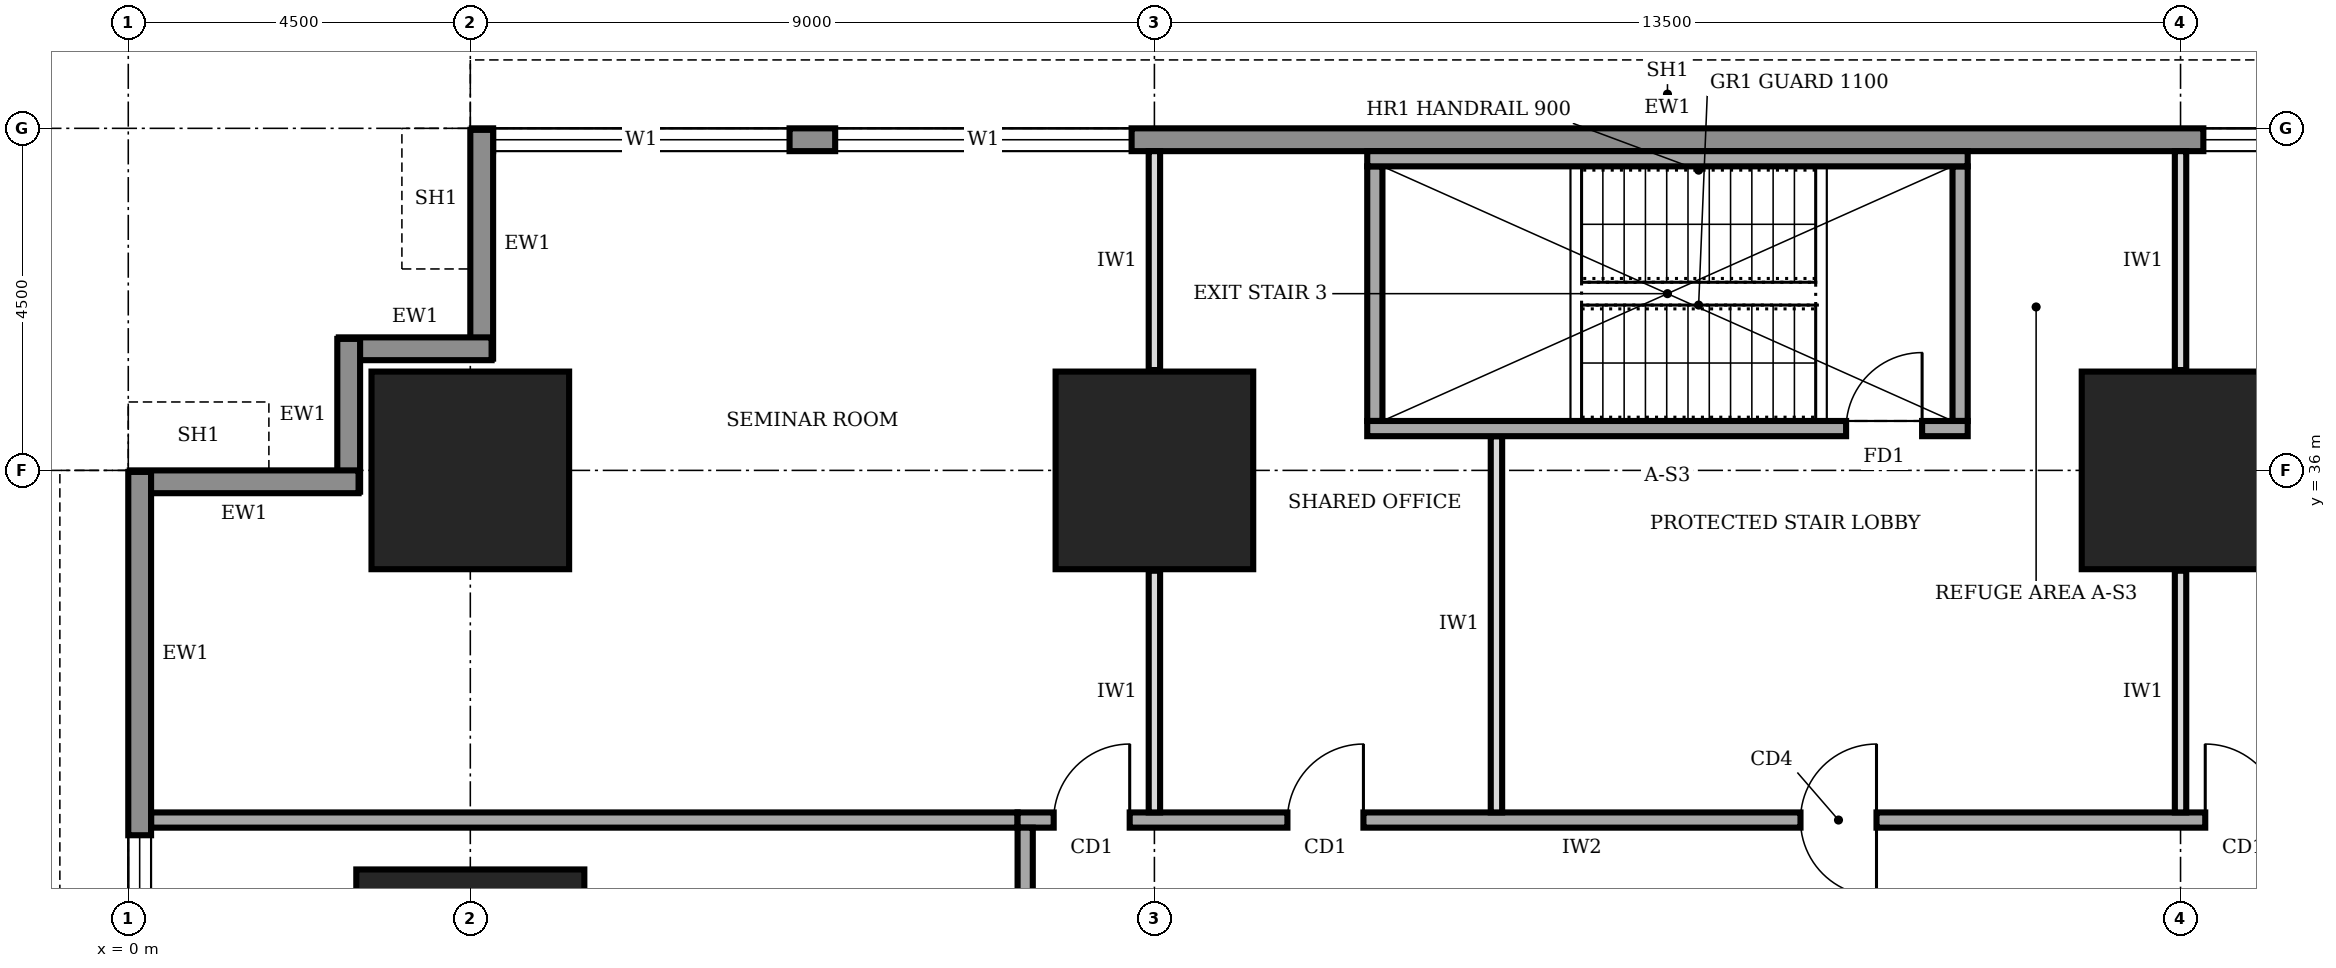
"""IFC4 building model, lengths in metres.
Left out: names, types, materials, properties, quantities, classifications, styles, units other than length and angle.
Written with IfcOpenShell. Run it as: python <this file> out.ifc"""

import sys

from ifc_helpers import new_model, si_unit, direction, frame, frame_2d, origin, origin_2d, place, context, subcontext, project, spatial, rectangle, extrude, element, fill, save


model = new_model("IFC4")
c1 = context("Model", 3, precision=1e-05, world=origin(), true_north=direction((0.0, 1.0)))
c2 = subcontext(c1, "Body", "Model", "MODEL_VIEW")
j1 = project(units=[si_unit("LENGTHUNIT", "METRE"), si_unit("PLANEANGLEUNIT", "RADIAN")], contexts=[c1])
p1 = place(None, origin())
s1 = spatial("IfcSite", under=j1, at=p1, CompositionType="ELEMENT")
p2 = place(p1, origin())
s2 = spatial("IfcBuilding", under=s1, at=p2, CompositionType="ELEMENT")
p3 = place(p2, frame((0.0, 0.0, 33.0)))
s3 = spatial("IfcBuildingStorey", under=s2, at=p3, CompositionType="ELEMENT", Elevation=33.0)
p4 = place(p3, frame((4.5, 29.25, 0.0), z_axis=(0.0, 0.0, 1.0), x_axis=(1.0, 0.0, 0.0)))
e1 = element("IfcColumn", 1, at=p4, inside=s3, PredefinedType="COLUMN", context=c2, shape_type="SweptSolid", body=[
    extrude(rectangle(XDim=3.0, YDim=3.0, at=origin_2d()), origin(), (0.0, 0.0, 1.0), 4.0),
])
for number, where, z_axis, x_axis in (
    (2, (4.5, 36.0, 0.0), (0.0, 0.0, 1.0), (1.0, 0.0, 0.0)),
    (3, (13.5, 36.0, 0.0), (0.0, 0.0, 1.0), (1.0, 0.0, 0.0)),
    (4, (27.0, 36.0, 0.0), (0.0, 0.0, 1.0), (1.0, 0.0, 0.0)),
):
    element("IfcColumn", number, at=place(p3, frame(where, z_axis=z_axis, x_axis=x_axis)), inside=s3, PredefinedType="COLUMN", context=c2, shape_type="SweptSolid", body=[
        extrude(rectangle(XDim=2.6, YDim=2.6, at=origin_2d()), origin(), (0.0, 0.0, 1.0), 4.0),
    ])
p5 = place(p3, frame((35.98, 40.35, 0.0), z_axis=(0.0, 0.0, 1.0), x_axis=(-1.0, 0.0, 0.0)))
e5 = element("IfcWall", 5, at=p5, inside=s3, PredefinedType="STANDARD", context=c2, shape_type="SweptSolid", body=[
    extrude(rectangle(XDim=31.46, YDim=0.3, at=frame_2d((15.73, 0.0))), origin(), (0.0, 0.0, 1.0), 3.75),
])
p6 = place(p5, frame((27.28, 0.0, 0.9)))
e6 = element("IfcOpeningElement", 6, at=p6, cuts=e5, PredefinedType="OPENING", context=c2, shape_type="SweptSolid", body=[
    extrude(rectangle(XDim=3.9, YDim=2.2, at=frame_2d((1.95, 1.1))), frame((0.0, 0.16, 0.0), z_axis=(0.0, -1.0, 0.0), x_axis=(1.0, 0.0, 0.0)), (0.0, 0.0, 1.0), 0.32),
])
p7 = place(p5, frame((22.78, 0.0, 0.9)))
e7 = element("IfcOpeningElement", 7, at=p7, cuts=e5, PredefinedType="OPENING", context=c2, shape_type="SweptSolid", body=[
    extrude(rectangle(XDim=3.9, YDim=2.2, at=frame_2d((1.95, 1.1))), frame((0.0, 0.16, 0.0), z_axis=(0.0, -1.0, 0.0), x_axis=(1.0, 0.0, 0.0)), (0.0, 0.0, 1.0), 0.32),
])
p8 = place(p5, frame((4.78, 0.0, 0.9)))
e8 = element("IfcOpeningElement", 8, at=p8, cuts=e5, PredefinedType="OPENING", context=c2, shape_type="SweptSolid", body=[
    extrude(rectangle(XDim=3.9, YDim=2.2, at=frame_2d((1.95, 1.1))), frame((0.0, 0.16, 0.0), z_axis=(0.0, -1.0, 0.0), x_axis=(1.0, 0.0, 0.0)), (0.0, 0.0, 1.0), 0.32),
])
p9 = place(p3, frame((4.65, 40.48, 0.0), z_axis=(0.0, 0.0, 1.0), x_axis=(0.0, -1.0, 0.0)))
e9 = element("IfcWall", 9, at=p9, inside=s3, PredefinedType="STANDARD", context=c2, shape_type="SweptSolid", body=[
    extrude(rectangle(XDim=3.01, YDim=0.3, at=frame_2d((1.505, 0.0))), origin(), (0.0, 0.0, 1.0), 2.85),
])
for number, where, z_axis, x_axis in (
    (10, (4.78, 37.6, 0.0), (0.0, 0.0, 1.0), (-1.0, 0.0, 0.0)),
    (11, (2.9, 37.73, 0.0), (0.0, 0.0, 1.0), (0.0, -1.0, 0.0)),
):
    element("IfcWall", number, at=place(p3, frame(where, z_axis=z_axis, x_axis=x_axis)), inside=s3, PredefinedType="STANDARD", context=c2, shape_type="SweptSolid", body=[
        extrude(rectangle(XDim=2.01, YDim=0.3, at=frame_2d((1.005, 0.0))), origin(), (0.0, 0.0, 1.0), 3.75),
    ])
p10 = place(p3, frame((3.03, 35.85, 0.0), z_axis=(0.0, 0.0, 1.0), x_axis=(-1.0, 0.0, 0.0)))
e12 = element("IfcWall", 12, at=p10, inside=s3, PredefinedType="STANDARD", context=c2, shape_type="SweptSolid", body=[
    extrude(rectangle(XDim=3.01, YDim=0.3, at=frame_2d((1.505, 0.0))), origin(), (0.0, 0.0, 1.0), 2.85),
])
p11 = place(p3, frame((0.15, 35.98, 0.0), z_axis=(0.0, 0.0, 1.0), x_axis=(0.0, -1.0, 0.0)))
e13 = element("IfcWall", 13, at=p11, inside=s3, PredefinedType="STANDARD", context=c2, shape_type="SweptSolid", body=[
    extrude(rectangle(XDim=31.46, YDim=0.3, at=frame_2d((15.73, 0.0))), origin(), (0.0, 0.0, 1.0), 3.75),
])
p12 = place(p11, frame((27.28, 0.0, 0.9)))
e14 = element("IfcOpeningElement", 14, at=p12, cuts=e13, PredefinedType="OPENING", context=c2, shape_type="SweptSolid", body=[
    extrude(rectangle(XDim=3.9, YDim=2.2, at=frame_2d((1.95, 1.1))), frame((0.0, 0.16, 0.0), z_axis=(0.0, -1.0, 0.0), x_axis=(1.0, 0.0, 0.0)), (0.0, 0.0, 1.0), 0.32),
])
p13 = place(p11, frame((22.78, 0.0, 0.9)))
e15 = element("IfcOpeningElement", 15, at=p13, cuts=e13, PredefinedType="OPENING", context=c2, shape_type="SweptSolid", body=[
    extrude(rectangle(XDim=3.9, YDim=2.2, at=frame_2d((1.95, 1.1))), frame((0.0, 0.16, 0.0), z_axis=(0.0, -1.0, 0.0), x_axis=(1.0, 0.0, 0.0)), (0.0, 0.0, 1.0), 0.32),
])
p14 = place(p11, frame((18.28, 0.0, 0.9)))
e16 = element("IfcOpeningElement", 16, at=p14, cuts=e13, PredefinedType="OPENING", context=c2, shape_type="SweptSolid", body=[
    extrude(rectangle(XDim=3.9, YDim=2.2, at=frame_2d((1.95, 1.1))), frame((0.0, 0.16, 0.0), z_axis=(0.0, -1.0, 0.0), x_axis=(1.0, 0.0, 0.0)), (0.0, 0.0, 1.0), 0.32),
])
p15 = place(p11, frame((13.78, 0.0, 0.9)))
e17 = element("IfcOpeningElement", 17, at=p15, cuts=e13, PredefinedType="OPENING", context=c2, shape_type="SweptSolid", body=[
    extrude(rectangle(XDim=3.9, YDim=2.2, at=frame_2d((1.95, 1.1))), frame((0.0, 0.16, 0.0), z_axis=(0.0, -1.0, 0.0), x_axis=(1.0, 0.0, 0.0)), (0.0, 0.0, 1.0), 0.32),
])
p16 = place(p11, frame((9.28, 0.0, 0.9)))
e18 = element("IfcOpeningElement", 18, at=p16, cuts=e13, PredefinedType="OPENING", context=c2, shape_type="SweptSolid", body=[
    extrude(rectangle(XDim=3.9, YDim=2.2, at=frame_2d((1.95, 1.1))), frame((0.0, 0.16, 0.0), z_axis=(0.0, -1.0, 0.0), x_axis=(1.0, 0.0, 0.0)), (0.0, 0.0, 1.0), 0.32),
])
p17 = place(p11, frame((4.78, 0.0, 0.9)))
e19 = element("IfcOpeningElement", 19, at=p17, cuts=e13, PredefinedType="OPENING", context=c2, shape_type="SweptSolid", body=[
    extrude(rectangle(XDim=3.9, YDim=2.2, at=frame_2d((1.95, 1.1))), frame((0.0, 0.16, 0.0), z_axis=(0.0, -1.0, 0.0), x_axis=(1.0, 0.0, 0.0)), (0.0, 0.0, 1.0), 0.32),
])
p18 = place(p3, frame((28.6, 31.4, 0.0), z_axis=(0.0, 0.0, 1.0), x_axis=(-1.0, 0.0, 0.0)))
e20 = element("IfcWall", 20, at=p18, inside=s3, PredefinedType="SOLIDWALL", context=c2, shape_type="SweptSolid", body=[
    extrude(rectangle(XDim=16.9, YDim=0.2, at=frame_2d((8.45, 0.0))), origin(), (0.0, 0.0, 1.0), 3.75),
])
p19 = place(p18, frame((15.425, 0.0, 0.0)))
e21 = element("IfcOpeningElement", 21, at=p19, cuts=e20, PredefinedType="OPENING", context=c2, shape_type="SweptSolid", body=[
    extrude(rectangle(XDim=1.0, YDim=2.1, at=frame_2d((0.5, 1.05))), frame((0.0, 0.11, 0.0), z_axis=(0.0, -1.0, 0.0), x_axis=(1.0, 0.0, 0.0)), (0.0, 0.0, 1.0), 0.22),
])
p20 = place(p18, frame((12.35, 0.0, 0.0)))
e22 = element("IfcOpeningElement", 22, at=p20, cuts=e20, PredefinedType="OPENING", context=c2, shape_type="SweptSolid", body=[
    extrude(rectangle(XDim=1.0, YDim=2.1, at=frame_2d((0.5, 1.05))), frame((0.0, 0.11, 0.0), z_axis=(0.0, -1.0, 0.0), x_axis=(1.0, 0.0, 0.0)), (0.0, 0.0, 1.0), 0.22),
])
p21 = place(p18, frame((5.6, 0.0, 0.0)))
e23 = element("IfcOpeningElement", 23, at=p21, cuts=e20, PredefinedType="OPENING", context=c2, shape_type="SweptSolid", body=[
    extrude(rectangle(XDim=1.0, YDim=2.1, at=frame_2d((0.5, 1.05))), frame((0.0, 0.11, 0.0), z_axis=(0.0, -1.0, 0.0), x_axis=(1.0, 0.0, 0.0)), (0.0, 0.0, 1.0), 0.22),
])
p22 = place(p18, frame((0.275, 0.0, 0.0)))
e24 = element("IfcOpeningElement", 24, at=p22, cuts=e20, PredefinedType="OPENING", context=c2, shape_type="SweptSolid", body=[
    extrude(rectangle(XDim=1.0, YDim=2.1, at=frame_2d((0.5, 1.05))), frame((0.0, 0.11, 0.0), z_axis=(0.0, -1.0, 0.0), x_axis=(1.0, 0.0, 0.0)), (0.0, 0.0, 1.0), 0.22),
])
p23 = place(p3, frame((11.8, 31.3, 0.0), z_axis=(0.0, 0.0, 1.0), x_axis=(0.0, -1.0, 0.0)))
e25 = element("IfcWall", 25, at=p23, inside=s3, PredefinedType="SOLIDWALL", context=c2, shape_type="SweptSolid", body=[
    extrude(rectangle(XDim=23.8, YDim=0.2, at=frame_2d((11.9, 0.0))), origin(), (0.0, 0.0, 1.0), 3.75),
])
p24 = place(p23, frame((20.3, 0.0, 0.0)))
e26 = element("IfcOpeningElement", 26, at=p24, cuts=e25, PredefinedType="OPENING", context=c2, shape_type="SweptSolid", body=[
    extrude(rectangle(XDim=1.0, YDim=2.1, at=frame_2d((0.5, 1.05))), frame((0.0, 0.11, 0.0), z_axis=(0.0, -1.0, 0.0), x_axis=(1.0, 0.0, 0.0)), (0.0, 0.0, 1.0), 0.22),
])
p25 = place(p23, frame((15.45, 0.0, 0.0)))
e27 = element("IfcOpeningElement", 27, at=p25, cuts=e25, PredefinedType="OPENING", context=c2, shape_type="SweptSolid", body=[
    extrude(rectangle(XDim=0.9, YDim=2.1, at=frame_2d((0.45, 1.05))), frame((0.0, 0.11, 0.0), z_axis=(0.0, -1.0, 0.0), x_axis=(1.0, 0.0, 0.0)), (0.0, 0.0, 1.0), 0.22),
])
p26 = place(p23, frame((12.45, 0.0, 0.0)))
e28 = element("IfcOpeningElement", 28, at=p26, cuts=e25, PredefinedType="OPENING", context=c2, shape_type="SweptSolid", body=[
    extrude(rectangle(XDim=0.9, YDim=2.1, at=frame_2d((0.45, 1.05))), frame((0.0, 0.11, 0.0), z_axis=(0.0, -1.0, 0.0), x_axis=(1.0, 0.0, 0.0)), (0.0, 0.0, 1.0), 0.22),
])
p27 = place(p23, frame((7.6, 0.0, 0.0)))
e29 = element("IfcOpeningElement", 29, at=p27, cuts=e25, PredefinedType="OPENING", context=c2, shape_type="SweptSolid", body=[
    extrude(rectangle(XDim=0.9, YDim=2.1, at=frame_2d((0.45, 1.05))), frame((0.0, 0.11, 0.0), z_axis=(0.0, -1.0, 0.0), x_axis=(1.0, 0.0, 0.0)), (0.0, 0.0, 1.0), 0.22),
])
p28 = place(p23, frame((4.8, 0.0, 0.0)))
e30 = element("IfcOpeningElement", 30, at=p28, cuts=e25, PredefinedType="OPENING", context=c2, shape_type="SweptSolid", body=[
    extrude(rectangle(XDim=1.0, YDim=2.1, at=frame_2d((0.5, 1.05))), frame((0.0, 0.11, 0.0), z_axis=(0.0, -1.0, 0.0), x_axis=(1.0, 0.0, 0.0)), (0.0, 0.0, 1.0), 0.22),
])
p29 = place(p23, frame((10.3, 0.0, 0.0)))
e31 = element("IfcOpeningElement", 31, at=p29, cuts=e25, PredefinedType="OPENING", context=c2, shape_type="SweptSolid", body=[
    extrude(rectangle(XDim=1.0, YDim=2.1, at=frame_2d((0.5, 1.05))), frame((0.0, 0.11, 0.0), z_axis=(0.0, -1.0, 0.0), x_axis=(1.0, 0.0, 0.0)), (0.0, 0.0, 1.0), 0.22),
])
p30 = place(p23, frame((1.55, 0.0, 0.0)))
e32 = element("IfcOpeningElement", 32, at=p30, cuts=e25, PredefinedType="OPENING", context=c2, shape_type="SweptSolid", body=[
    extrude(rectangle(XDim=1.0, YDim=2.1, at=frame_2d((0.5, 1.05))), frame((0.0, 0.11, 0.0), z_axis=(0.0, -1.0, 0.0), x_axis=(1.0, 0.0, 0.0)), (0.0, 0.0, 1.0), 0.22),
])
p31 = place(p3, frame((0.3, 31.4, 0.0), z_axis=(0.0, 0.0, 1.0), x_axis=(1.0, 0.0, 0.0)))
e33 = element("IfcWall", 33, at=p31, inside=s3, PredefinedType="SOLIDWALL", context=c2, shape_type="SweptSolid", body=[
    extrude(rectangle(XDim=11.4, YDim=0.2, at=frame_2d((5.7, 0.0))), origin(), (0.0, 0.0, 1.0), 3.75),
])
p32 = place(p3, frame((13.5, 31.5, 0.0), z_axis=(0.0, 0.0, 1.0), x_axis=(0.0, 1.0, 0.0)))
e34 = element("IfcWall", 34, at=p32, inside=s3, PredefinedType="PARTITIONING", context=c2, shape_type="SweptSolid", body=[
    extrude(rectangle(XDim=3.18, YDim=0.15, at=frame_2d((1.59, 0.0))), origin(), (0.0, 0.0, 1.0), 2.85),
])
p33 = place(p3, frame((13.5, 37.32, 0.0), z_axis=(0.0, 0.0, 1.0), x_axis=(0.0, 1.0, 0.0)))
e35 = element("IfcWall", 35, at=p33, inside=s3, PredefinedType="PARTITIONING", context=c2, shape_type="SweptSolid", body=[
    extrude(rectangle(XDim=2.88, YDim=0.15, at=frame_2d((1.44, 0.0))), origin(), (0.0, 0.0, 1.0), 2.85),
])
p34 = place(p3, frame((18.0, 31.5, 0.0), z_axis=(0.0, 0.0, 1.0), x_axis=(0.0, 1.0, 0.0)))
e36 = element("IfcWall", 36, at=p34, inside=s3, PredefinedType="PARTITIONING", context=c2, shape_type="SweptSolid", body=[
    extrude(rectangle(XDim=4.95, YDim=0.15, at=frame_2d((2.475, 0.0))), origin(), (0.0, 0.0, 1.0), 3.75),
])
p35 = place(p3, frame((27.0, 31.5, 0.0), z_axis=(0.0, 0.0, 1.0), x_axis=(0.0, 1.0, 0.0)))
e37 = element("IfcWall", 37, at=p35, inside=s3, PredefinedType="PARTITIONING", context=c2, shape_type="SweptSolid", body=[
    extrude(rectangle(XDim=3.18, YDim=0.15, at=frame_2d((1.59, 0.0))), origin(), (0.0, 0.0, 1.0), 2.85),
])
p36 = place(p3, frame((27.0, 37.32, 0.0), z_axis=(0.0, 0.0, 1.0), x_axis=(0.0, 1.0, 0.0)))
e38 = element("IfcWall", 38, at=p36, inside=s3, PredefinedType="PARTITIONING", context=c2, shape_type="SweptSolid", body=[
    extrude(rectangle(XDim=2.88, YDim=0.15, at=frame_2d((1.44, 0.0))), origin(), (0.0, 0.0, 1.0), 2.85),
])
p37 = place(p3, frame((16.3, 36.55, 0.0), z_axis=(0.0, 0.0, 1.0), x_axis=(1.0, 0.0, 0.0)))
e39 = element("IfcWall", 39, at=p37, inside=s3, PredefinedType="SOLIDWALL", context=c2, shape_type="SweptSolid", body=[
    extrude(rectangle(XDim=7.9, YDim=0.2, at=frame_2d((3.95, 0.0))), origin(), (0.0, 0.0, 1.0), 3.75),
])
p38 = place(p37, frame((6.3, 0.0, 0.0)))
e40 = element("IfcOpeningElement", 40, at=p38, cuts=e39, PredefinedType="OPENING", context=c2, shape_type="SweptSolid", body=[
    extrude(rectangle(XDim=1.0, YDim=2.1, at=frame_2d((0.5, 1.05))), frame((0.0, 0.11, 0.0), z_axis=(0.0, -1.0, 0.0), x_axis=(1.0, 0.0, 0.0)), (0.0, 0.0, 1.0), 0.22),
])
p39 = place(p3, frame((16.3, 40.1, 0.0), z_axis=(0.0, 0.0, 1.0), x_axis=(1.0, 0.0, 0.0)))
e41 = element("IfcWall", 41, at=p39, inside=s3, PredefinedType="SOLIDWALL", context=c2, shape_type="SweptSolid", body=[
    extrude(rectangle(XDim=7.9, YDim=0.2, at=frame_2d((3.95, 0.0))), origin(), (0.0, 0.0, 1.0), 3.75),
])
for number, where, z_axis, x_axis in (
    (42, (16.4, 36.65, 0.0), (0.0, 0.0, 1.0), (0.0, 1.0, 0.0)),
    (43, (24.1, 36.65, 0.0), (0.0, 0.0, 1.0), (0.0, 1.0, 0.0)),
):
    element("IfcWall", number, at=place(p3, frame(where, z_axis=z_axis, x_axis=x_axis)), inside=s3, PredefinedType="SOLIDWALL", context=c2, shape_type="SweptSolid", body=[
        extrude(rectangle(XDim=3.35, YDim=0.2, at=frame_2d((1.675, 0.0))), origin(), (0.0, 0.0, 1.0), 3.75),
    ])
p40 = place(p6, origin())
e44 = element("IfcWindow", 44, at=p40, inside=s3, PartitioningType="SINGLE_PANEL", PredefinedType="WINDOW", context=c2, shape_type="SweptSolid", body=[
    extrude(rectangle(XDim=3.9, YDim=2.2, at=frame_2d((1.95, 1.1))), frame((0.0, 0.03, 0.0), z_axis=(0.0, -1.0, 0.0), x_axis=(1.0, 0.0, 0.0)), (0.0, 0.0, 1.0), 0.06),
])
fill(e6, e44)
p41 = place(p7, origin())
e45 = element("IfcWindow", 45, at=p41, inside=s3, PartitioningType="SINGLE_PANEL", PredefinedType="WINDOW", context=c2, shape_type="SweptSolid", body=[
    extrude(rectangle(XDim=3.9, YDim=2.2, at=frame_2d((1.95, 1.1))), frame((0.0, 0.03, 0.0), z_axis=(0.0, -1.0, 0.0), x_axis=(1.0, 0.0, 0.0)), (0.0, 0.0, 1.0), 0.06),
])
fill(e7, e45)
p42 = place(p8, origin())
e46 = element("IfcWindow", 46, at=p42, inside=s3, PartitioningType="SINGLE_PANEL", PredefinedType="WINDOW", context=c2, shape_type="SweptSolid", body=[
    extrude(rectangle(XDim=3.9, YDim=2.2, at=frame_2d((1.95, 1.1))), frame((0.0, 0.03, 0.0), z_axis=(0.0, -1.0, 0.0), x_axis=(1.0, 0.0, 0.0)), (0.0, 0.0, 1.0), 0.06),
])
fill(e8, e46)
p43 = place(p17, origin())
e47 = element("IfcWindow", 47, at=p43, inside=s3, PartitioningType="SINGLE_PANEL", PredefinedType="WINDOW", context=c2, shape_type="SweptSolid", body=[
    extrude(rectangle(XDim=3.9, YDim=2.2, at=frame_2d((1.95, 1.1))), frame((0.0, 0.03, 0.0), z_axis=(0.0, -1.0, 0.0), x_axis=(1.0, 0.0, 0.0)), (0.0, 0.0, 1.0), 0.06),
])
fill(e19, e47)
p44 = place(p19, frame((1.0, 0.0, 0.0), z_axis=(0.0, 0.0, 1.0), x_axis=(-1.0, 0.0, 0.0)))
e48 = element("IfcDoor", 48, at=p44, inside=s3, OperationType="SINGLE_SWING_RIGHT", PredefinedType="DOOR", context=c2, shape_type="SweptSolid", body=[
    extrude(rectangle(XDim=1.0, YDim=2.1, at=frame_2d((0.5, 1.05))), frame((0.0, 0.025, 0.0), z_axis=(0.0, -1.0, 0.0), x_axis=(1.0, 0.0, 0.0)), (0.0, 0.0, 1.0), 0.05),
])
fill(e21, e48)
p45 = place(p20, frame((1.0, 0.0, 0.0), z_axis=(0.0, 0.0, 1.0), x_axis=(-1.0, 0.0, 0.0)))
e49 = element("IfcDoor", 49, at=p45, inside=s3, OperationType="SINGLE_SWING_RIGHT", PredefinedType="DOOR", context=c2, shape_type="SweptSolid", body=[
    extrude(rectangle(XDim=1.0, YDim=2.1, at=frame_2d((0.5, 1.05))), frame((0.0, 0.025, 0.0), z_axis=(0.0, -1.0, 0.0), x_axis=(1.0, 0.0, 0.0)), (0.0, 0.0, 1.0), 0.05),
])
fill(e22, e49)
p46 = place(p21, origin())
e50 = element("IfcDoor", 50, at=p46, inside=s3, OperationType="DOUBLE_SWING_LEFT", PredefinedType="DOOR", context=c2, shape_type="SweptSolid", body=[
    extrude(rectangle(XDim=1.0, YDim=2.1, at=frame_2d((0.5, 1.05))), frame((0.0, 0.025, 0.0), z_axis=(0.0, -1.0, 0.0), x_axis=(1.0, 0.0, 0.0)), (0.0, 0.0, 1.0), 0.05),
])
fill(e23, e50)
p47 = place(p22, frame((1.0, 0.0, 0.0), z_axis=(0.0, 0.0, 1.0), x_axis=(-1.0, 0.0, 0.0)))
e51 = element("IfcDoor", 51, at=p47, inside=s3, OperationType="SINGLE_SWING_LEFT", PredefinedType="DOOR", context=c2, shape_type="SweptSolid", body=[
    extrude(rectangle(XDim=1.0, YDim=2.1, at=frame_2d((0.5, 1.05))), frame((0.0, 0.025, 0.0), z_axis=(0.0, -1.0, 0.0), x_axis=(1.0, 0.0, 0.0)), (0.0, 0.0, 1.0), 0.05),
])
fill(e24, e51)
p48 = place(p38, origin())
e52 = element("IfcDoor", 52, at=p48, inside=s3, OperationType="SINGLE_SWING_RIGHT", PredefinedType="DOOR", context=c2, shape_type="SweptSolid", body=[
    extrude(rectangle(XDim=1.0, YDim=2.1, at=frame_2d((0.5, 1.05))), frame((0.0, 0.025, 0.0), z_axis=(0.0, -1.0, 0.0), x_axis=(1.0, 0.0, 0.0)), (0.0, 0.0, 1.0), 0.05),
])
fill(e40, e52)
save(model, sys.argv[1])
